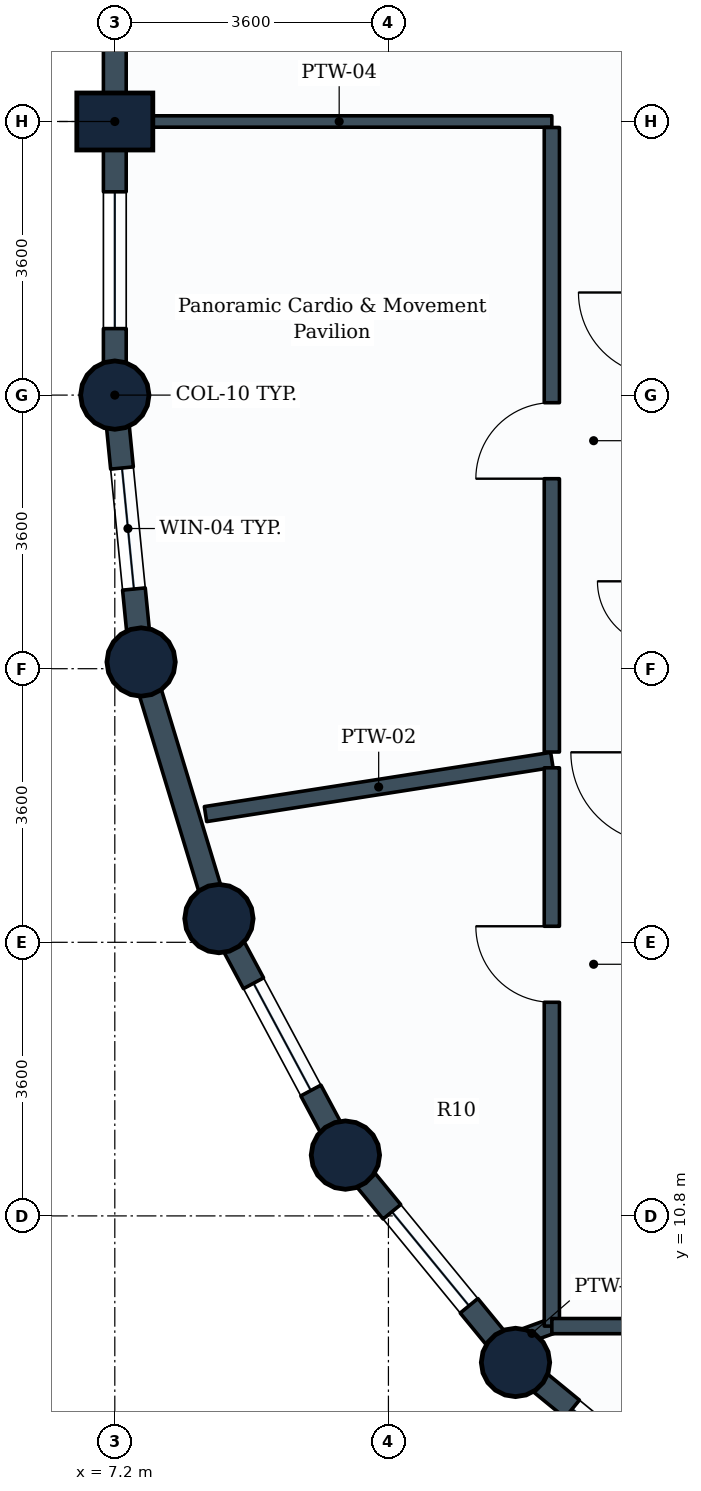
"""IFC4 building model, lengths in metres.
Left out: names, types, materials, properties, quantities, classifications, styles, units other than length and angle.
Written with IfcOpenShell. Run it as: python <this file> out.ifc"""

import sys

from ifc_helpers import new_model, si_unit, direction, frame, frame_2d, origin, origin_2d, place, context, subcontext, project, spatial, rectangle, circle, extrude, element, fill, save


model = new_model("IFC4")
c1 = context("Model", 3, precision=1e-05, world=origin(), true_north=direction((0.0, 1.0)))
c2 = subcontext(c1, "Body", "Model", "MODEL_VIEW")
j1 = project(units=[si_unit("LENGTHUNIT", "METRE"), si_unit("PLANEANGLEUNIT", "RADIAN")], contexts=[c1])
p1 = place(None, origin())
s1 = spatial("IfcSite", under=j1, at=p1, CompositionType="ELEMENT")
p2 = place(p1, origin())
s2 = spatial("IfcBuilding", under=s1, at=p2, CompositionType="ELEMENT")
p3 = place(p2, frame((0.0, 0.0, 142.8)))
s3 = spatial("IfcBuildingStorey", under=s2, at=p3, CompositionType="ELEMENT", Elevation=142.8)
p4 = place(p3, frame((7.2, 21.6, 0.0), z_axis=(0.0, 0.0, 1.0), x_axis=(1.0, 0.0, 0.0)))
e1 = element("IfcColumn", 1, at=p4, inside=s3, PredefinedType="COLUMN", context=c2, shape_type="SweptSolid", body=[
    extrude(circle(Radius=0.45, at=origin_2d()), origin(), (0.0, 0.0, 1.0), 3.8),
])
p5 = place(p3, frame((7.2, 25.2, 0.0), z_axis=(0.0, 0.0, 1.0), x_axis=(0.0, 1.0, 0.0)))
e2 = element("IfcColumn", 2, at=p5, inside=s3, PredefinedType="COLUMN", context=c2, shape_type="SweptSolid", body=[
    extrude(rectangle(XDim=0.75, YDim=1.0, at=origin_2d()), origin(), (0.0, 0.0, 1.0), 3.8),
])
for number, where, z_axis, x_axis in (
    (3, (7.546, 18.088, 0.0), (0.0, 0.0, 1.0), (1.0, 0.0, 0.0)),
    (4, (8.57, 14.712, 0.0), (0.0, 0.0, 1.0), (1.0, 0.0, 0.0)),
    (5, (10.234, 11.6, 0.0), (0.0, 0.0, 1.0), (1.0, 0.0, 0.0)),
    (6, (12.472, 8.872, 0.0), (0.0, 0.0, 1.0), (1.0, 0.0, 0.0)),
):
    element("IfcColumn", number, at=place(p3, frame(where, z_axis=z_axis, x_axis=x_axis)), inside=s3, PredefinedType="COLUMN", context=c2, shape_type="SweptSolid", body=[
        extrude(circle(Radius=0.45, at=origin_2d()), origin(), (0.0, 0.0, 1.0), 3.8),
    ])
p6 = place(p3, frame((7.2, 25.2, 0.0), z_axis=(0.0, 0.0, 1.0), x_axis=(0.0, 1.0, 0.0)))
e7 = element("IfcWall", 7, at=p6, inside=s3, PredefinedType="STANDARD", context=c2, shape_type="SweptSolid", body=[
    extrude(rectangle(XDim=3.6, YDim=0.3, at=frame_2d((1.8, 0.0))), origin(), (0.0, 0.0, 1.0), 2.93),
])
p7 = place(p3, frame((7.2, 21.6, 0.0), z_axis=(0.0, 0.0, 1.0), x_axis=(0.0, 1.0, 0.0)))
e8 = element("IfcWall", 8, at=p7, inside=s3, PredefinedType="STANDARD", context=c2, shape_type="SweptSolid", body=[
    extrude(rectangle(XDim=3.6, YDim=0.3, at=frame_2d((1.8, 0.0))), origin(), (0.0, 0.0, 1.0), 2.93),
])
p8 = place(p7, frame((0.875, 0.0, 0.85)))
e9 = element("IfcOpeningElement", 9, at=p8, cuts=e8, PredefinedType="OPENING", context=c2, shape_type="SweptSolid", body=[
    extrude(rectangle(XDim=1.8, YDim=1.35, at=frame_2d((0.9, 0.675))), frame((0.0, 0.16, 0.0), z_axis=(0.0, -1.0, 0.0), x_axis=(1.0, 0.0, 0.0)), (0.0, 0.0, 1.0), 0.32),
])
p9 = place(p3, frame((7.546, 18.088, 0.0), z_axis=(0.0, 0.0, 1.0), x_axis=(-0.09802417461, 0.995184033831, 0.0)))
e10 = element("IfcWall", 10, at=p9, inside=s3, PredefinedType="STANDARD", context=c2, shape_type="SweptSolid", body=[
    extrude(rectangle(XDim=3.529, YDim=0.3, at=frame_2d((1.765, 0.0))), origin(), (0.0, 0.0, 1.0), 2.93),
])
p10 = place(p9, frame((0.965, 0.0, 0.85)))
e11 = element("IfcOpeningElement", 11, at=p10, cuts=e10, PredefinedType="OPENING", context=c2, shape_type="SweptSolid", body=[
    extrude(rectangle(XDim=1.6, YDim=1.35, at=frame_2d((0.8, 0.675))), frame((0.0, 0.16, 0.0), z_axis=(0.0, -1.0, 0.0), x_axis=(1.0, 0.0, 0.0)), (0.0, 0.0, 1.0), 0.32),
])
p11 = place(p3, frame((8.57, 14.712, 0.0), z_axis=(0.0, 0.0, 1.0), x_axis=(-0.290305086481, 0.956934144423, 0.0)))
e12 = element("IfcWall", 12, at=p11, inside=s3, PredefinedType="STANDARD", context=c2, shape_type="SweptSolid", body=[
    extrude(rectangle(XDim=3.528, YDim=0.3, at=frame_2d((1.764, 0.0))), origin(), (0.0, 0.0, 1.0), 2.93),
])
p12 = place(p3, frame((10.234, 11.6, 0.0), z_axis=(0.0, 0.0, 1.0), x_axis=(-0.47151087309, 0.881860247748, 0.0)))
e13 = element("IfcWall", 13, at=p12, inside=s3, PredefinedType="STANDARD", context=c2, shape_type="SweptSolid", body=[
    extrude(rectangle(XDim=3.529, YDim=0.3, at=frame_2d((1.764, 0.0))), origin(), (0.0, 0.0, 1.0), 2.93),
])
p13 = place(p12, frame((0.964, 0.0, 0.85)))
e14 = element("IfcOpeningElement", 14, at=p13, cuts=e13, PredefinedType="OPENING", context=c2, shape_type="SweptSolid", body=[
    extrude(rectangle(XDim=1.6, YDim=1.35, at=frame_2d((0.8, 0.675))), frame((0.0, 0.16, 0.0), z_axis=(0.0, -1.0, 0.0), x_axis=(1.0, 0.0, 0.0)), (0.0, 0.0, 1.0), 0.32),
])
p14 = place(p3, frame((12.472, 8.872, 0.0), z_axis=(0.0, 0.0, 1.0), x_axis=(-0.634258295121, 0.773121216285, 0.0)))
e15 = element("IfcWall", 15, at=p14, inside=s3, PredefinedType="STANDARD", context=c2, shape_type="SweptSolid", body=[
    extrude(rectangle(XDim=3.529, YDim=0.3, at=frame_2d((1.764, 0.0))), origin(), (0.0, 0.0, 1.0), 2.93),
])
p15 = place(p14, frame((0.964, 0.0, 0.85)))
e16 = element("IfcOpeningElement", 16, at=p15, cuts=e15, PredefinedType="OPENING", context=c2, shape_type="SweptSolid", body=[
    extrude(rectangle(XDim=1.6, YDim=1.35, at=frame_2d((0.8, 0.675))), frame((0.0, 0.16, 0.0), z_axis=(0.0, -1.0, 0.0), x_axis=(1.0, 0.0, 0.0)), (0.0, 0.0, 1.0), 0.32),
])
p16 = place(p3, frame((15.2, 6.634, 0.0), z_axis=(0.0, 0.0, 1.0), x_axis=(-0.773121216285, 0.634258295121, 0.0)))
e17 = element("IfcWall", 17, at=p16, inside=s3, PredefinedType="STANDARD", context=c2, shape_type="SweptSolid", body=[
    extrude(rectangle(XDim=3.529, YDim=0.3, at=frame_2d((1.764, 0.0))), origin(), (0.0, 0.0, 1.0), 2.93),
])
p17 = place(p16, frame((0.964, 0.0, 0.85)))
e18 = element("IfcOpeningElement", 18, at=p17, cuts=e17, PredefinedType="OPENING", context=c2, shape_type="SweptSolid", body=[
    extrude(rectangle(XDim=1.6, YDim=1.35, at=frame_2d((0.8, 0.675))), frame((0.0, 0.16, 0.0), z_axis=(0.0, -1.0, 0.0), x_axis=(1.0, 0.0, 0.0)), (0.0, 0.0, 1.0), 0.32),
])
p18 = place(p3, frame((7.354, 25.2, 0.0), z_axis=(0.0, 0.0, 1.0), x_axis=(1.0, 0.0, 0.0)))
e19 = element("IfcWall", 19, at=p18, inside=s3, PredefinedType="PARTITIONING", context=c2, shape_type="SweptSolid", body=[
    extrude(rectangle(XDim=5.596, YDim=0.15, at=frame_2d((2.798, 0.0))), origin(), (0.0, 0.0, 1.0), 3.535),
])
p19 = place(p3, frame((12.95, 16.8, 0.0), z_axis=(0.0, 0.0, 1.0), x_axis=(-0.987973652082, -0.154622323068, 0.0)))
e20 = element("IfcWall", 20, at=p19, inside=s3, PredefinedType="PARTITIONING", context=c2, shape_type="SweptSolid", body=[
    extrude(rectangle(XDim=4.612, YDim=0.2, at=frame_2d((2.306, 0.0))), origin(), (0.0, 0.0, 1.0), 2.93),
])
p20 = place(p3, frame((12.95, 9.35, 0.0), z_axis=(0.0, 0.0, 1.0), x_axis=(-0.939538101119, -0.342444384601, 0.0)))
e21 = element("IfcWall", 21, at=p20, inside=s3, PredefinedType="PARTITIONING", context=c2, shape_type="SweptSolid", body=[
    extrude(rectangle(XDim=0.559, YDim=0.2, at=frame_2d((0.279, 0.0))), origin(), (0.0, 0.0, 1.0), 2.93),
])
p21 = place(p3, frame((12.95, 16.904, 0.0), z_axis=(0.0, 0.0, 1.0), x_axis=(0.0, 1.0, 0.0)))
e22 = element("IfcWall", 22, at=p21, inside=s3, PredefinedType="PARTITIONING", context=c2, shape_type="SweptSolid", body=[
    extrude(rectangle(XDim=8.217, YDim=0.2, at=frame_2d((4.108, 0.0))), origin(), (0.0, 0.0, 1.0), 3.18),
])
p22 = place(p21, frame((3.596, 0.0, 0.0)))
e23 = element("IfcOpeningElement", 23, at=p22, cuts=e22, PredefinedType="OPENING", context=c2, shape_type="SweptSolid", body=[
    extrude(rectangle(XDim=1.0, YDim=2.1, at=frame_2d((0.5, 1.05))), frame((0.0, 0.11, 0.0), z_axis=(0.0, -1.0, 0.0), x_axis=(1.0, 0.0, 0.0)), (0.0, 0.0, 1.0), 0.22),
])
p23 = place(p3, frame((12.95, 9.35, 0.0), z_axis=(0.0, 0.0, 1.0), x_axis=(0.0, 1.0, 0.0)))
e24 = element("IfcWall", 24, at=p23, inside=s3, PredefinedType="PARTITIONING", context=c2, shape_type="SweptSolid", body=[
    extrude(rectangle(XDim=7.346, YDim=0.2, at=frame_2d((3.673, 0.0))), origin(), (0.0, 0.0, 1.0), 3.17),
])
p24 = place(p23, frame((4.261, 0.0, 0.0)))
e25 = element("IfcOpeningElement", 25, at=p24, cuts=e24, PredefinedType="OPENING", context=c2, shape_type="SweptSolid", body=[
    extrude(rectangle(XDim=1.0, YDim=2.1, at=frame_2d((0.5, 1.05))), frame((0.0, 0.11, 0.0), z_axis=(0.0, -1.0, 0.0), x_axis=(1.0, 0.0, 0.0)), (0.0, 0.0, 1.0), 0.22),
])
p25 = place(p3, frame((12.95, 9.35, 0.0), z_axis=(0.0, 0.0, 1.0), x_axis=(1.0, 0.0, 0.0)))
e26 = element("IfcWall", 26, at=p25, inside=s3, PredefinedType="PARTITIONING", context=c2, shape_type="SweptSolid", body=[
    extrude(rectangle(XDim=7.346, YDim=0.2, at=frame_2d((3.673, 0.0))), origin(), (0.0, 0.0, 1.0), 3.18),
])
p26 = place(p25, frame((4.261, 0.0, 0.0)))
e27 = element("IfcOpeningElement", 27, at=p26, cuts=e26, PredefinedType="OPENING", context=c2, shape_type="SweptSolid", body=[
    extrude(rectangle(XDim=1.0, YDim=2.1, at=frame_2d((0.5, 1.05))), frame((0.0, 0.11, 0.0), z_axis=(0.0, -1.0, 0.0), x_axis=(1.0, 0.0, 0.0)), (0.0, 0.0, 1.0), 0.22),
])
p27 = place(p8, origin())
e28 = element("IfcWindow", 28, at=p27, inside=s3, PartitioningType="SINGLE_PANEL", PredefinedType="WINDOW", context=c2, shape_type="SweptSolid", body=[
    extrude(rectangle(XDim=1.8, YDim=1.35, at=frame_2d((0.9, 0.675))), frame((0.0, 0.03, 0.0), z_axis=(0.0, -1.0, 0.0), x_axis=(1.0, 0.0, 0.0)), (0.0, 0.0, 1.0), 0.06),
])
fill(e9, e28)
p28 = place(p10, origin())
e29 = element("IfcWindow", 29, at=p28, inside=s3, PartitioningType="SINGLE_PANEL", PredefinedType="WINDOW", context=c2, shape_type="SweptSolid", body=[
    extrude(rectangle(XDim=1.6, YDim=1.35, at=frame_2d((0.8, 0.675))), frame((0.0, 0.03, 0.0), z_axis=(0.0, -1.0, 0.0), x_axis=(1.0, 0.0, 0.0)), (0.0, 0.0, 1.0), 0.06),
])
fill(e11, e29)
p29 = place(p13, origin())
e30 = element("IfcWindow", 30, at=p29, inside=s3, PartitioningType="SINGLE_PANEL", PredefinedType="WINDOW", context=c2, shape_type="SweptSolid", body=[
    extrude(rectangle(XDim=1.6, YDim=1.35, at=frame_2d((0.8, 0.675))), frame((0.0, 0.03, 0.0), z_axis=(0.0, -1.0, 0.0), x_axis=(1.0, 0.0, 0.0)), (0.0, 0.0, 1.0), 0.06),
])
fill(e14, e30)
p30 = place(p15, origin())
e31 = element("IfcWindow", 31, at=p30, inside=s3, PartitioningType="SINGLE_PANEL", PredefinedType="WINDOW", context=c2, shape_type="SweptSolid", body=[
    extrude(rectangle(XDim=1.6, YDim=1.35, at=frame_2d((0.8, 0.675))), frame((0.0, 0.03, 0.0), z_axis=(0.0, -1.0, 0.0), x_axis=(1.0, 0.0, 0.0)), (0.0, 0.0, 1.0), 0.06),
])
fill(e16, e31)
p31 = place(p17, origin())
e32 = element("IfcWindow", 32, at=p31, inside=s3, PartitioningType="SINGLE_PANEL", PredefinedType="WINDOW", context=c2, shape_type="SweptSolid", body=[
    extrude(rectangle(XDim=1.6, YDim=1.35, at=frame_2d((0.8, 0.675))), frame((0.0, 0.03, 0.0), z_axis=(0.0, -1.0, 0.0), x_axis=(1.0, 0.0, 0.0)), (0.0, 0.0, 1.0), 0.06),
])
fill(e18, e32)
p32 = place(p22, origin())
e33 = element("IfcDoor", 33, at=p32, inside=s3, OperationType="SINGLE_SWING_LEFT", PredefinedType="DOOR", context=c2, shape_type="SweptSolid", body=[
    extrude(rectangle(XDim=1.0, YDim=2.1, at=frame_2d((0.5, 1.05))), frame((0.0, 0.025, 0.0), z_axis=(0.0, -1.0, 0.0), x_axis=(1.0, 0.0, 0.0)), (0.0, 0.0, 1.0), 0.05),
])
fill(e23, e33)
p33 = place(p24, origin())
e34 = element("IfcDoor", 34, at=p33, inside=s3, OperationType="SINGLE_SWING_RIGHT", PredefinedType="DOOR", context=c2, shape_type="SweptSolid", body=[
    extrude(rectangle(XDim=1.0, YDim=2.1, at=frame_2d((0.5, 1.05))), frame((0.0, 0.025, 0.0), z_axis=(0.0, -1.0, 0.0), x_axis=(1.0, 0.0, 0.0)), (0.0, 0.0, 1.0), 0.05),
])
fill(e25, e34)
save(model, sys.argv[1])
